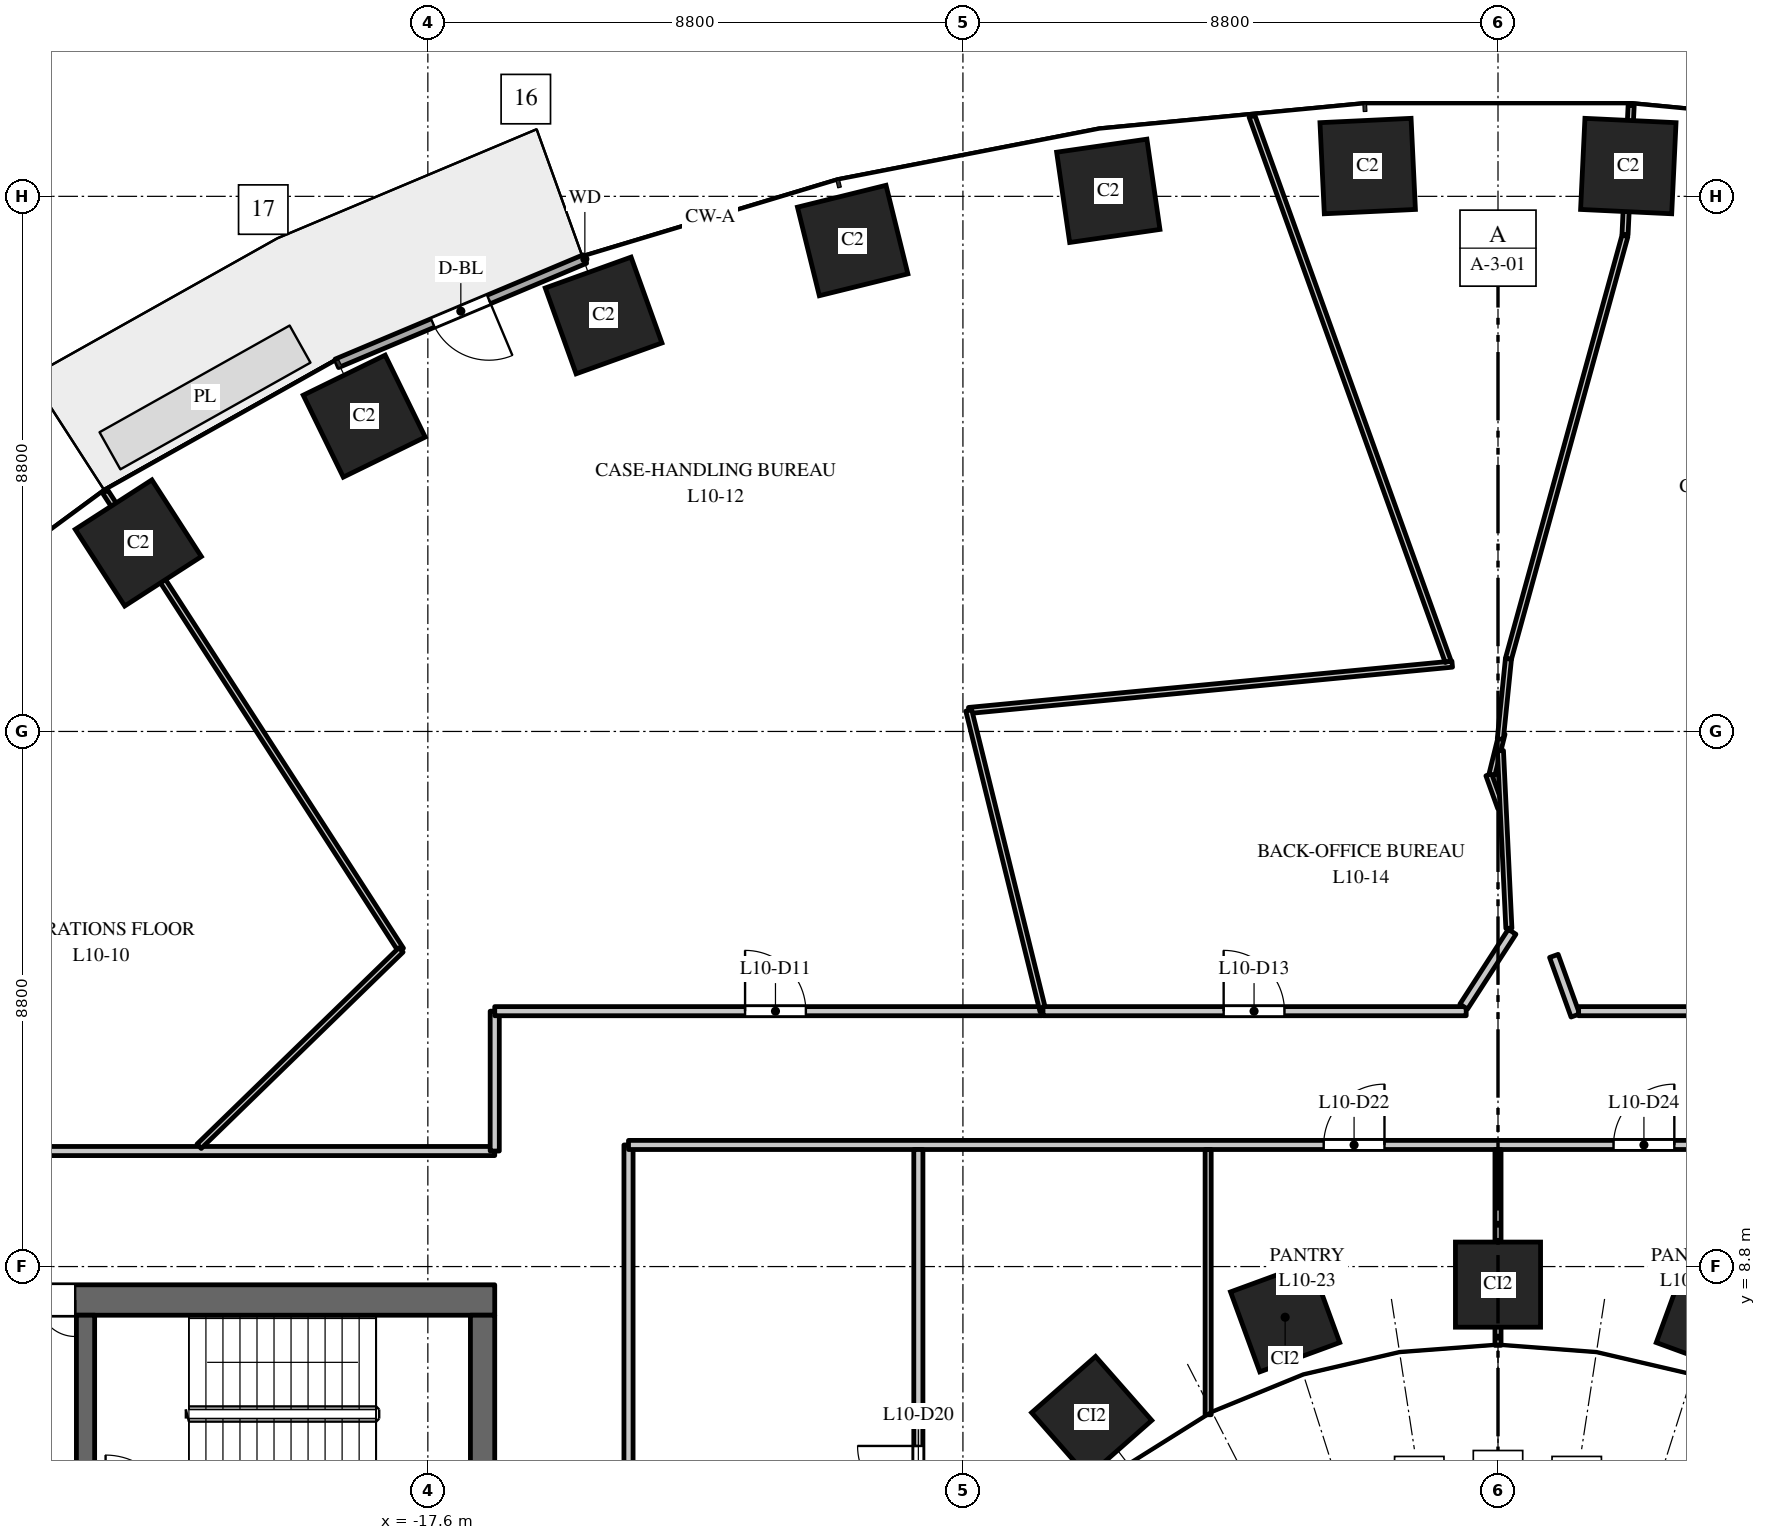
"""IFC4 building model, lengths in metres.
Left out: names, types, materials, properties, quantities, classifications, styles, units other than length and angle.
Written with IfcOpenShell. Run it as: python <this file> out.ifc"""

import sys

from ifc_helpers import new_model, si_unit, direction, frame, frame_2d, origin, origin_2d, place, context, subcontext, project, spatial, rectangle, extrude, element, fill, save


model = new_model("IFC4")
c1 = context("Model", 3, precision=1e-05, world=origin(), true_north=direction((0.0, 1.0)))
c2 = subcontext(c1, "Body", "Model", "MODEL_VIEW")
j1 = project(units=[si_unit("LENGTHUNIT", "METRE"), si_unit("PLANEANGLEUNIT", "RADIAN")], contexts=[c1])
p1 = place(None, origin())
s1 = spatial("IfcSite", under=j1, at=p1, CompositionType="ELEMENT")
p2 = place(p1, origin())
s2 = spatial("IfcBuilding", under=s1, at=p2, CompositionType="ELEMENT")
p3 = place(p2, frame((0.0, 0.0, 50.5)))
s3 = spatial("IfcBuildingStorey", under=s2, at=p3, CompositionType="ELEMENT", Elevation=50.5)
for number, where, z_axis, x_axis in (
    (1, (2.143, 26.898, 0.0), (0.0, 0.0, 1.0), (-0.999, 0.048, 0.0)),
    (2, (-2.143, 26.898, 0.0), (0.0, 0.0, 1.0), (-0.999, -0.048, 0.0)),
    (3, (-6.409, 26.491, 0.0), (0.0, 0.0, 1.0), (-0.99, -0.143, 0.0)),
    (4, (-10.613, 25.674, 0.0), (0.0, 0.0, 1.0), (-0.971, -0.24, 0.0)),
    (5, (-14.709, 24.441, 0.0), (0.0, 0.0, 1.0), (-0.941, -0.338, 0.0)),
    (6, (-18.646, 22.785, 0.0), (0.0, 0.0, 1.0), (-0.898, -0.439, 0.0)),
    (7, (-22.362, 20.7, 0.0), (0.0, 0.0, 1.0), (-0.84, -0.542, 0.0)),
):
    element("IfcColumn", number, at=place(p3, frame(where, z_axis=z_axis, x_axis=x_axis)), inside=s3, PredefinedType="COLUMN", context=c2, shape_type="SweptSolid", body=[
        extrude(rectangle(XDim=1.5, YDim=1.5, at=origin_2d()), origin(), (0.0, 0.0, 1.0), 4.0),
    ])
for number, where, z_axis, x_axis in (
    (8, (3.501, 7.967, 0.0), (0.0, 0.0, 1.0), (-0.939, 0.344, 0.0)),
    (9, (0.0, 8.503, 0.0), (0.0, 0.0, 1.0), (-1.0, 0.0, 0.0)),
    (10, (-3.501, 7.967, 0.0), (0.0, 0.0, 1.0), (-0.939, -0.344, 0.0)),
    (11, (-6.682, 6.334, 0.0), (0.0, 0.0, 1.0), (-0.751, -0.66, 0.0)),
):
    element("IfcColumn", number, at=place(p3, frame(where, z_axis=z_axis, x_axis=x_axis)), inside=s3, PredefinedType="COLUMN", context=c2, shape_type="SweptSolid", body=[
        extrude(rectangle(XDim=1.4, YDim=1.4, at=origin_2d()), origin(), (0.0, 0.0, 1.0), 4.0),
    ])
p4 = place(p3, frame((-16.5, 8.25, 0.0), z_axis=(0.0, 0.0, 1.0), x_axis=(-1.0, 0.0, 0.0)))
e12 = element("IfcWall", 12, at=p4, inside=s3, PredefinedType="SHEAR", context=c2, shape_type="SweptSolid", body=[
    extrude(rectangle(XDim=15.0, YDim=0.5, at=frame_2d((7.5, 0.0))), origin(), (0.0, 0.0, 1.0), 3.7),
])
p5 = place(p4, frame((6.9, 0.0, 0.0)))
e13 = element("IfcOpeningElement", 13, at=p5, cuts=e12, PredefinedType="OPENING", context=c2, shape_type="SweptSolid", body=[
    extrude(rectangle(XDim=1.2, YDim=2.1, at=frame_2d((0.6, 1.05))), frame((0.0, 0.26, 0.0), z_axis=(0.0, -1.0, 0.0), x_axis=(1.0, 0.0, 0.0)), (0.0, 0.0, 1.0), 0.52),
])
p6 = place(p4, frame((12.425, 0.0, 0.0)))
e14 = element("IfcOpeningElement", 14, at=p6, cuts=e12, PredefinedType="OPENING", context=c2, shape_type="SweptSolid", body=[
    extrude(rectangle(XDim=0.9, YDim=2.1, at=frame_2d((0.45, 1.05))), frame((0.0, 0.26, 0.0), z_axis=(0.0, -1.0, 0.0), x_axis=(1.0, 0.0, 0.0)), (0.0, 0.0, 1.0), 0.52),
])
p7 = place(p3, frame((-16.7, -8.0, 0.0), z_axis=(0.0, 0.0, 1.0), x_axis=(0.0, 1.0, 0.0)))
e15 = element("IfcWall", 15, at=p7, inside=s3, PredefinedType="SHEAR", context=c2, shape_type="SweptSolid", body=[
    extrude(rectangle(XDim=16.0, YDim=0.4, at=frame_2d((8.0, 0.0))), origin(), (0.0, 0.0, 1.0), 3.7),
])
p8 = place(p3, frame((-23.23, 2.25, 0.0), z_axis=(0.0, 0.0, 1.0), x_axis=(0.0, 1.0, 0.0)))
e16 = element("IfcWall", 16, at=p8, inside=s3, PredefinedType="SHEAR", context=c2, shape_type="SweptSolid", body=[
    extrude(rectangle(XDim=5.75, YDim=0.3, at=frame_2d((2.875, 0.0))), origin(), (0.0, 0.0, 1.0), 3.7),
])
p9 = place(p8, frame((0.6, 0.0, 0.0)))
e17 = element("IfcOpeningElement", 17, at=p9, cuts=e16, PredefinedType="OPENING", context=c2, shape_type="SweptSolid", body=[
    extrude(rectangle(XDim=1.0, YDim=2.1, at=frame_2d((0.5, 1.05))), frame((0.0, 0.16, 0.0), z_axis=(0.0, -1.0, 0.0), x_axis=(1.0, 0.0, 0.0)), (0.0, 0.0, 1.0), 0.32),
])
p10 = place(p3, frame((-15.018, 25.369, 0.0), z_axis=(0.0, 0.0, 1.0), x_axis=(-0.921816985161, -0.387625393736, 0.0)))
e18 = element("IfcWall", 18, at=p10, inside=s3, PredefinedType="STANDARD", context=c2, shape_type="SweptSolid", body=[
    extrude(rectangle(XDim=4.426, YDim=0.15, at=frame_2d((2.213, 0.0))), origin(), (0.0, 0.0, 1.0), 3.7),
])
p11 = place(p10, frame((1.713, 0.0, 0.0)))
e19 = element("IfcOpeningElement", 19, at=p11, cuts=e18, PredefinedType="OPENING", context=c2, shape_type="SweptSolid", body=[
    extrude(rectangle(XDim=1.0, YDim=2.4, at=frame_2d((0.5, 1.2))), frame((0.0, 0.085, 0.0), z_axis=(0.0, -1.0, 0.0), x_axis=(1.0, 0.0, 0.0)), (0.0, 0.0, 1.0), 0.17),
])
p12 = place(p3, frame((-31.5, 10.7, 0.0), z_axis=(0.0, 0.0, 1.0), x_axis=(1.0, 0.0, 0.0)))
e20 = element("IfcWall", 20, at=p12, inside=s3, PredefinedType="PARTITIONING", context=c2, shape_type="SweptSolid", body=[
    extrude(rectangle(XDim=15.0, YDim=0.15, at=frame_2d((7.5, 0.0))), origin(), (0.0, 0.0, 1.0), 3.1),
])
p13 = place(p12, frame((5.414, 0.0, 0.0)))
e21 = element("IfcOpeningElement", 21, at=p13, cuts=e20, PredefinedType="OPENING", context=c2, shape_type="SweptSolid", body=[
    extrude(rectangle(XDim=1.0, YDim=2.1, at=frame_2d((0.5, 1.05))), frame((0.0, 0.085, 0.0), z_axis=(0.0, -1.0, 0.0), x_axis=(1.0, 0.0, 0.0)), (0.0, 0.0, 1.0), 0.17),
])
p14 = place(p3, frame((-22.905, 21.542, 0.0), z_axis=(0.0, 0.0, 1.0), x_axis=(0.542241597628, -0.840222619192, 0.0)))
e22 = element("IfcWall", 22, at=p14, inside=s3, PredefinedType="PARTITIONING", context=c2, shape_type="SweptSolid", body=[
    extrude(rectangle(XDim=8.967, YDim=0.1, at=frame_2d((4.483, 0.0))), origin(), (0.0, 0.0, 1.0), 2.85),
])
p15 = place(p3, frame((-21.362, 10.778, 0.0), z_axis=(0.0, 0.0, 1.0), x_axis=(0.716869759063, 0.697207105917, 0.0)))
e23 = element("IfcWall", 23, at=p15, inside=s3, PredefinedType="PARTITIONING", context=c2, shape_type="SweptSolid", body=[
    extrude(rectangle(XDim=4.631, YDim=0.1, at=frame_2d((2.316, 0.0))), origin(), (0.0, 0.0, 1.0), 2.75),
])
p16 = place(p3, frame((-16.5, 10.7, 0.0), z_axis=(0.0, 0.0, 1.0), x_axis=(0.0, 1.0, 0.0)))
e24 = element("IfcWall", 24, at=p16, inside=s3, PredefinedType="PARTITIONING", context=c2, shape_type="SweptSolid", body=[
    extrude(rectangle(XDim=2.3, YDim=0.15, at=frame_2d((1.15, 0.0))), origin(), (0.0, 0.0, 1.0), 2.75),
])
p17 = place(p3, frame((-16.5, 13.0, 0.0), z_axis=(0.0, 0.0, 1.0), x_axis=(1.0, 0.0, 0.0)))
e25 = element("IfcWall", 25, at=p17, inside=s3, PredefinedType="PARTITIONING", context=c2, shape_type="SweptSolid", body=[
    extrude(rectangle(XDim=9.001, YDim=0.15, at=frame_2d((4.5, 0.0))), origin(), (0.0, 0.0, 1.0), 2.85),
])
p18 = place(p17, frame((4.117, 0.0, 0.0)))
e26 = element("IfcOpeningElement", 26, at=p18, cuts=e25, PredefinedType="OPENING", context=c2, shape_type="SweptSolid", body=[
    extrude(rectangle(XDim=1.0, YDim=2.1, at=frame_2d((0.5, 1.05))), frame((0.0, 0.085, 0.0), z_axis=(0.0, -1.0, 0.0), x_axis=(1.0, 0.0, 0.0)), (0.0, 0.0, 1.0), 0.17),
])
p19 = place(p3, frame((-14.3, -10.8, 0.0), z_axis=(0.0, 0.0, 1.0), x_axis=(0.0, 1.0, 0.0)))
e27 = element("IfcWall", 27, at=p19, inside=s3, PredefinedType="PARTITIONING", context=c2, shape_type="SweptSolid", body=[
    extrude(rectangle(XDim=21.6, YDim=0.15, at=frame_2d((10.8, 0.0))), origin(), (0.0, 0.0, 1.0), 2.75),
])
p20 = place(p19, frame((10.4, 0.0, 0.0)))
e28 = element("IfcOpeningElement", 28, at=p20, cuts=e27, PredefinedType="OPENING", context=c2, shape_type="SweptSolid", body=[
    extrude(rectangle(XDim=1.0, YDim=2.1, at=frame_2d((0.5, 1.05))), frame((0.0, 0.085, 0.0), z_axis=(0.0, -1.0, 0.0), x_axis=(1.0, 0.0, 0.0)), (0.0, 0.0, 1.0), 0.17),
])
p21 = place(p3, frame((-14.3, 10.8, 0.0), z_axis=(0.0, 0.0, 1.0), x_axis=(1.0, 0.0, 0.0)))
e29 = element("IfcWall", 29, at=p21, inside=s3, PredefinedType="PARTITIONING", context=c2, shape_type="SweptSolid", body=[
    extrude(rectangle(XDim=28.6, YDim=0.15, at=frame_2d((14.3, 0.0))), origin(), (0.0, 0.0, 1.0), 2.85),
])
p22 = place(p21, frame((11.433, 0.0, 0.0)))
e30 = element("IfcOpeningElement", 30, at=p22, cuts=e29, PredefinedType="OPENING", context=c2, shape_type="SweptSolid", body=[
    extrude(rectangle(XDim=1.0, YDim=2.1, at=frame_2d((0.5, 1.05))), frame((0.0, 0.085, 0.0), z_axis=(0.0, -1.0, 0.0), x_axis=(1.0, 0.0, 0.0)), (0.0, 0.0, 1.0), 0.17),
])
p23 = place(p21, frame((16.2, 0.0, 0.0)))
e31 = element("IfcOpeningElement", 31, at=p23, cuts=e29, PredefinedType="OPENING", context=c2, shape_type="SweptSolid", body=[
    extrude(rectangle(XDim=1.0, YDim=2.1, at=frame_2d((0.5, 1.05))), frame((0.0, 0.085, 0.0), z_axis=(0.0, -1.0, 0.0), x_axis=(1.0, 0.0, 0.0)), (0.0, 0.0, 1.0), 0.17),
])
p24 = place(p21, frame((20.967, 0.0, 0.0)))
e32 = element("IfcOpeningElement", 32, at=p24, cuts=e29, PredefinedType="OPENING", context=c2, shape_type="SweptSolid", body=[
    extrude(rectangle(XDim=1.0, YDim=2.1, at=frame_2d((0.5, 1.05))), frame((0.0, 0.085, 0.0), z_axis=(0.0, -1.0, 0.0), x_axis=(1.0, 0.0, 0.0)), (0.0, 0.0, 1.0), 0.17),
])
p25 = place(p3, frame((-9.533, -10.725, 0.0), z_axis=(0.0, 0.0, 1.0), x_axis=(0.0, 1.0, 0.0)))
e33 = element("IfcWall", 33, at=p25, inside=s3, PredefinedType="PARTITIONING", context=c2, shape_type="SweptSolid", body=[
    extrude(rectangle(XDim=21.45, YDim=0.15, at=frame_2d((10.725, 0.0))), origin(), (0.0, 0.0, 1.0), 2.75),
])
p26 = place(p25, frame((15.575, 0.0, 0.0)))
e34 = element("IfcOpeningElement", 34, at=p26, cuts=e33, PredefinedType="OPENING", context=c2, shape_type="SweptSolid", body=[
    extrude(rectangle(XDim=1.0, YDim=2.1, at=frame_2d((0.5, 1.05))), frame((0.0, 0.085, 0.0), z_axis=(0.0, -1.0, 0.0), x_axis=(1.0, 0.0, 0.0)), (0.0, 0.0, 1.0), 0.17),
])
p27 = place(p3, frame((-8.704, 17.945, 0.0), z_axis=(0.0, 0.0, 1.0), x_axis=(0.995439666097, 0.095393244838, 0.0)))
e35 = element("IfcWall", 35, at=p27, inside=s3, PredefinedType="PARTITIONING", context=c2, shape_type="SweptSolid", body=[
    extrude(rectangle(XDim=7.988, YDim=0.1, at=frame_2d((3.994, 0.0))), origin(), (0.0, 0.0, 1.0), 2.85),
])
p28 = place(p3, frame((-8.704, 17.946, 0.0), z_axis=(0.0, 0.0, 1.0), x_axis=(0.239704393154, -0.970845921814, 0.0)))
e36 = element("IfcWall", 36, at=p28, inside=s3, PredefinedType="PARTITIONING", context=c2, shape_type="SweptSolid", body=[
    extrude(rectangle(XDim=5.094, YDim=0.1, at=frame_2d((2.547, 0.0))), origin(), (0.0, 0.0, 1.0), 3.7),
])
p29 = place(p3, frame((-7.483, 13.0, 0.0), z_axis=(0.0, 0.0, 1.0), x_axis=(1.0, 0.0, 0.0)))
e37 = element("IfcWall", 37, at=p29, inside=s3, PredefinedType="PARTITIONING", context=c2, shape_type="SweptSolid", body=[
    extrude(rectangle(XDim=6.96, YDim=0.15, at=frame_2d((3.48, 0.0))), origin(), (0.0, 0.0, 1.0), 2.85),
])
p30 = place(p29, frame((2.971, 0.0, 0.0)))
e38 = element("IfcOpeningElement", 38, at=p30, cuts=e37, PredefinedType="OPENING", context=c2, shape_type="SweptSolid", body=[
    extrude(rectangle(XDim=1.0, YDim=2.1, at=frame_2d((0.5, 1.05))), frame((0.0, 0.085, 0.0), z_axis=(0.0, -1.0, 0.0), x_axis=(1.0, 0.0, 0.0)), (0.0, 0.0, 1.0), 0.17),
])
p31 = place(p3, frame((-4.767, 6.363, 0.0), z_axis=(0.0, 0.0, 1.0), x_axis=(0.0, 1.0, 0.0)))
e39 = element("IfcWall", 39, at=p31, inside=s3, PredefinedType="PARTITIONING", context=c2, shape_type="SweptSolid", body=[
    extrude(rectangle(XDim=4.362, YDim=0.1, at=frame_2d((2.181, 0.0))), origin(), (0.0, 0.0, 1.0), 2.85),
])
p32 = place(p3, frame((-4.046, 27.717, 0.0), z_axis=(0.0, 0.0, 1.0), x_axis=(0.338447260677, -0.940985362129, 0.0)))
e40 = element("IfcWall", 40, at=p32, inside=s3, PredefinedType="PARTITIONING", context=c2, shape_type="SweptSolid", body=[
    extrude(rectangle(XDim=9.528, YDim=0.1, at=frame_2d((4.764, 0.0))), origin(), (0.0, 0.0, 1.0), 2.85),
])
p33 = place(p3, frame((-0.564, 13.075, 0.0), z_axis=(0.0, 0.0, 1.0), x_axis=(0.542961200627, 0.839757783301, 0.0)))
e41 = element("IfcWall", 41, at=p33, inside=s3, PredefinedType="PARTITIONING", context=c2, shape_type="SweptSolid", body=[
    extrude(rectangle(XDim=1.466, YDim=0.15, at=frame_2d((0.733, 0.0))), origin(), (0.0, 0.0, 1.0), 3.7),
])
p34 = place(p3, frame((-0.152, 16.888, 0.0), z_axis=(0.0, 0.0, 1.0), x_axis=(0.339185428329, -0.940719535892, 0.0)))
e42 = element("IfcWall", 42, at=p34, inside=s3, PredefinedType="PARTITIONING", context=c2, shape_type="SweptSolid", body=[
    extrude(rectangle(XDim=0.575, YDim=0.1, at=frame_2d((0.288, 0.0))), origin(), (0.0, 0.0, 1.0), 3.7),
])
p35 = place(p3, frame((-0.099, 16.892, 0.0), z_axis=(0.0, 0.0, 1.0), x_axis=(0.239223165208, 0.970964611728, 0.0)))
e43 = element("IfcWall", 43, at=p35, inside=s3, PredefinedType="PARTITIONING", context=c2, shape_type="SweptSolid", body=[
    extrude(rectangle(XDim=0.694, YDim=0.1, at=frame_2d((0.347, 0.0))), origin(), (0.0, 0.0, 1.0), 3.7),
])
p36 = place(p3, frame((0.0, 7.504, 0.0), z_axis=(0.0, 0.0, 1.0), x_axis=(0.0, 1.0, 0.0)))
e44 = element("IfcWall", 44, at=p36, inside=s3, PredefinedType="PARTITIONING", context=c2, shape_type="SweptSolid", body=[
    extrude(rectangle(XDim=3.221, YDim=0.1, at=frame_2d((1.611, 0.0))), origin(), (0.0, 0.0, 1.0), 3.7),
])
p37 = place(p3, frame((0.04, 17.284, 0.0), z_axis=(0.0, 0.0, 1.0), x_axis=(0.047505648741, -0.998870969314, 0.0)))
e45 = element("IfcWall", 45, at=p37, inside=s3, PredefinedType="PARTITIONING", context=c2, shape_type="SweptSolid", body=[
    extrude(rectangle(XDim=2.924, YDim=0.1, at=frame_2d((1.462, 0.0))), origin(), (0.0, 0.0, 1.0), 3.7),
])
p38 = place(p3, frame((0.038, 17.474, 0.0), z_axis=(0.0, 0.0, 1.0), x_axis=(0.100886401076, 0.99489795159, 0.0)))
e46 = element("IfcWall", 46, at=p38, inside=s3, PredefinedType="PARTITIONING", context=c2, shape_type="SweptSolid", body=[
    extrude(rectangle(XDim=1.329, YDim=0.1, at=frame_2d((0.664, 0.0))), origin(), (0.0, 0.0, 1.0), 3.7),
])
p39 = place(p3, frame((0.172, 18.796, 0.0), z_axis=(0.0, 0.0, 1.0), x_axis=(0.265628515821, 0.964075459486, 0.0)))
e47 = element("IfcWall", 47, at=p39, inside=s3, PredefinedType="PARTITIONING", context=c2, shape_type="SweptSolid", body=[
    extrude(rectangle(XDim=7.212, YDim=0.1, at=frame_2d((3.606, 0.0))), origin(), (0.0, 0.0, 1.0), 3.7),
])
p40 = place(p3, frame((0.919, 13.909, 0.0), z_axis=(0.0, 0.0, 1.0), x_axis=(0.338918653524, -0.94081568136, 0.0)))
e48 = element("IfcWall", 48, at=p40, inside=s3, PredefinedType="PARTITIONING", context=c2, shape_type="SweptSolid", body=[
    extrude(rectangle(XDim=1.042, YDim=0.15, at=frame_2d((0.521, 0.0))), origin(), (0.0, 0.0, 1.0), 3.7),
])
p41 = place(p3, frame((1.326, 13.0, 0.0), z_axis=(0.0, 0.0, 1.0), x_axis=(1.0, 0.0, 0.0)))
e49 = element("IfcWall", 49, at=p41, inside=s3, PredefinedType="PARTITIONING", context=c2, shape_type="SweptSolid", body=[
    extrude(rectangle(XDim=6.721, YDim=0.15, at=frame_2d((3.361, 0.0))), origin(), (0.0, 0.0, 1.0), 2.85),
])
p42 = place(p41, frame((2.681, 0.0, 0.0)))
e50 = element("IfcOpeningElement", 50, at=p42, cuts=e49, PredefinedType="OPENING", context=c2, shape_type="SweptSolid", body=[
    extrude(rectangle(XDim=1.0, YDim=2.1, at=frame_2d((0.5, 1.05))), frame((0.0, 0.085, 0.0), z_axis=(0.0, -1.0, 0.0), x_axis=(1.0, 0.0, 0.0)), (0.0, 0.0, 1.0), 0.17),
])
p43 = place(p3, frame((2.089, 25.77, 0.0), z_axis=(0.0, 0.0, 1.0), x_axis=(0.04733101585, 0.99887925944, 0.0)))
e51 = element("IfcWall", 51, at=p43, inside=s3, PredefinedType="PARTITIONING", context=c2, shape_type="SweptSolid", body=[
    extrude(rectangle(XDim=2.13, YDim=0.1, at=frame_2d((1.065, 0.0))), origin(), (0.0, 0.0, 1.0), 2.85),
])
p44 = place(p5, origin())
e52 = element("IfcDoor", 52, at=p44, inside=s3, OperationType="DOUBLE_DOOR_DOUBLE_SWING", PredefinedType="DOOR", context=c2, shape_type="SweptSolid", body=[
    extrude(rectangle(XDim=1.2, YDim=2.1, at=frame_2d((0.6, 1.05))), frame((0.0, 0.025, 0.0), z_axis=(0.0, -1.0, 0.0), x_axis=(1.0, 0.0, 0.0)), (0.0, 0.0, 1.0), 0.05),
])
fill(e13, e52)
p45 = place(p11, origin())
e53 = element("IfcDoor", 53, at=p45, inside=s3, OperationType="SINGLE_SWING_LEFT", PredefinedType="DOOR", context=c2, shape_type="SweptSolid", body=[
    extrude(rectangle(XDim=1.0, YDim=2.4, at=frame_2d((0.5, 1.2))), frame((0.0, 0.025, 0.0), z_axis=(0.0, -1.0, 0.0), x_axis=(1.0, 0.0, 0.0)), (0.0, 0.0, 1.0), 0.05),
])
fill(e19, e53)
p46 = place(p18, origin())
e54 = element("IfcDoor", 54, at=p46, inside=s3, OperationType="SINGLE_SWING_LEFT", PredefinedType="DOOR", context=c2, shape_type="SweptSolid", body=[
    extrude(rectangle(XDim=1.0, YDim=2.1, at=frame_2d((0.5, 1.05))), frame((0.0, 0.025, 0.0), z_axis=(0.0, -1.0, 0.0), x_axis=(1.0, 0.0, 0.0)), (0.0, 0.0, 1.0), 0.05),
])
fill(e26, e54)
p47 = place(p30, origin())
e55 = element("IfcDoor", 55, at=p47, inside=s3, OperationType="SINGLE_SWING_LEFT", PredefinedType="DOOR", context=c2, shape_type="SweptSolid", body=[
    extrude(rectangle(XDim=1.0, YDim=2.1, at=frame_2d((0.5, 1.05))), frame((0.0, 0.025, 0.0), z_axis=(0.0, -1.0, 0.0), x_axis=(1.0, 0.0, 0.0)), (0.0, 0.0, 1.0), 0.05),
])
fill(e38, e55)
p48 = place(p26, origin())
e56 = element("IfcDoor", 56, at=p48, inside=s3, OperationType="SINGLE_SWING_RIGHT", PredefinedType="DOOR", context=c2, shape_type="SweptSolid", body=[
    extrude(rectangle(XDim=1.0, YDim=2.1, at=frame_2d((0.5, 1.05))), frame((0.0, 0.025, 0.0), z_axis=(0.0, -1.0, 0.0), x_axis=(1.0, 0.0, 0.0)), (0.0, 0.0, 1.0), 0.05),
])
fill(e34, e56)
p49 = place(p22, origin())
e57 = element("IfcDoor", 57, at=p49, inside=s3, OperationType="SINGLE_SWING_RIGHT", PredefinedType="DOOR", context=c2, shape_type="SweptSolid", body=[
    extrude(rectangle(XDim=1.0, YDim=2.1, at=frame_2d((0.5, 1.05))), frame((0.0, 0.025, 0.0), z_axis=(0.0, -1.0, 0.0), x_axis=(1.0, 0.0, 0.0)), (0.0, 0.0, 1.0), 0.05),
])
fill(e30, e57)
p50 = place(p23, origin())
e58 = element("IfcDoor", 58, at=p50, inside=s3, OperationType="SINGLE_SWING_RIGHT", PredefinedType="DOOR", context=c2, shape_type="SweptSolid", body=[
    extrude(rectangle(XDim=1.0, YDim=2.1, at=frame_2d((0.5, 1.05))), frame((0.0, 0.025, 0.0), z_axis=(0.0, -1.0, 0.0), x_axis=(1.0, 0.0, 0.0)), (0.0, 0.0, 1.0), 0.05),
])
fill(e31, e58)
save(model, sys.argv[1])
